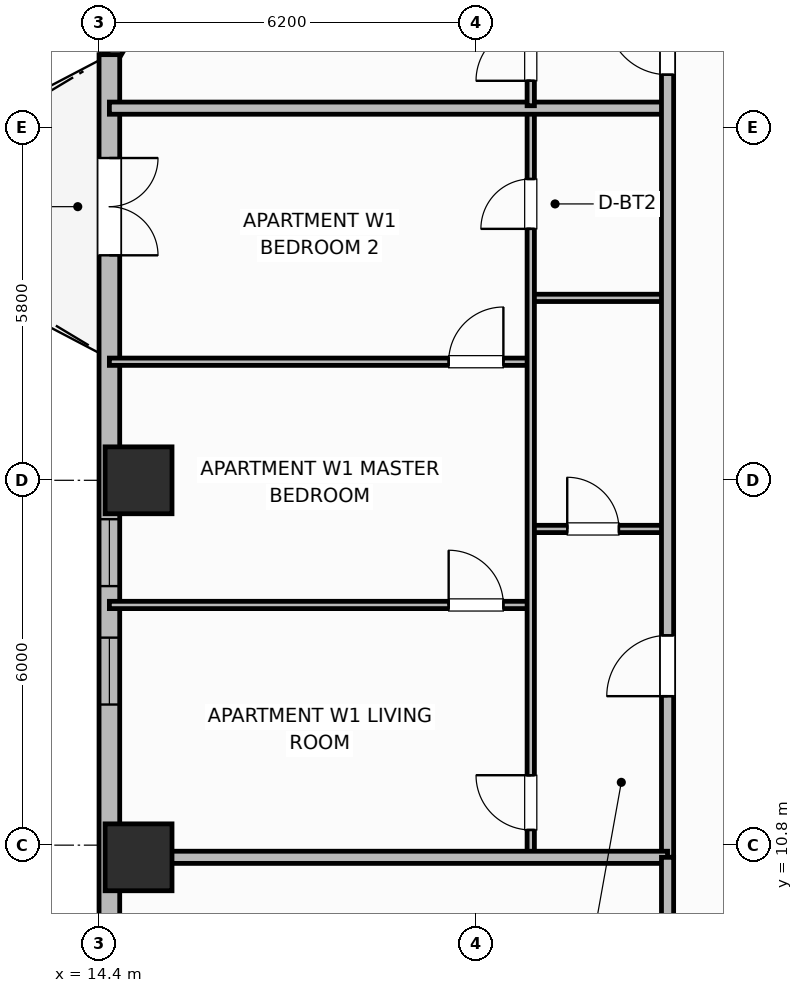
"""IFC4 building model, lengths in metres.
Left out: names, types, materials, properties, quantities, classifications, styles, units other than length and angle.
Written with IfcOpenShell. Run it as: python <this file> out.ifc"""

import sys

from ifc_helpers import new_model, si_unit, direction, frame, frame_2d, origin, origin_2d, place, context, subcontext, project, spatial, rectangle, extrude, element, fill, save


model = new_model("IFC4")
c1 = context("Model", 3, precision=1e-05, world=origin(), true_north=direction((0.0, 1.0)))
c2 = subcontext(c1, "Body", "Model", "MODEL_VIEW")
j1 = project(units=[si_unit("LENGTHUNIT", "METRE"), si_unit("PLANEANGLEUNIT", "RADIAN")], contexts=[c1])
p1 = place(None, origin())
s1 = spatial("IfcSite", under=j1, at=p1, CompositionType="ELEMENT")
p2 = place(p1, origin())
s2 = spatial("IfcBuilding", under=s1, at=p2, CompositionType="ELEMENT")
p3 = place(p2, frame((0.0, 0.0, 114.2)))
s3 = spatial("IfcBuildingStorey", under=s2, at=p3, CompositionType="ELEMENT", Elevation=114.2)
for number, where, z_axis, x_axis in (
    (1, (15.05, 10.6, 0.0), (0.0, 0.0, 1.0), (1.0, 0.0, 0.0)),
    (2, (15.05, 16.8, 0.0), (0.0, 0.0, 1.0), (1.0, 0.0, 0.0)),
):
    element("IfcColumn", number, at=place(p3, frame(where, z_axis=z_axis, x_axis=x_axis)), inside=s3, PredefinedType="COLUMN", context=c2, shape_type="SweptSolid", body=[
        extrude(rectangle(XDim=1.1, YDim=1.1, at=origin_2d()), origin(), (0.0, 0.0, 1.0), 3.7),
    ])
p4 = place(p3, frame((15.87, 26.0, 0.0), z_axis=(0.0, 0.0, 1.0), x_axis=(-0.508751843651, -0.860913213734, 0.0)))
e3 = element("IfcWall", 3, at=p4, inside=s3, PredefinedType="SOLIDWALL", context=c2, shape_type="SweptSolid", body=[
    extrude(rectangle(XDim=2.555, YDim=0.34, at=frame_2d((1.278, 0.0))), origin(), (0.0, 0.0, 1.0), 2.7),
])
p5 = place(p4, frame((0.728, 0.0, 0.89)))
e4 = element("IfcOpeningElement", 4, at=p5, cuts=e3, PredefinedType="OPENING", context=c2, shape_type="SweptSolid", body=[
    extrude(rectangle(XDim=1.1, YDim=1.65, at=frame_2d((0.55, 0.825))), frame((0.0, 0.18, 0.0), z_axis=(0.0, -1.0, 0.0), x_axis=(1.0, 0.0, 0.0)), (0.0, 0.0, 1.0), 0.36),
])
p6 = place(p3, frame((14.57, 23.8, 0.0), z_axis=(0.0, 0.0, 1.0), x_axis=(0.0, -1.0, 0.0)))
e5 = element("IfcWall", 5, at=p6, inside=s3, PredefinedType="SOLIDWALL", context=c2, shape_type="SweptSolid", body=[
    extrude(rectangle(XDim=14.8, YDim=0.34, at=frame_2d((7.4, 0.0))), origin(), (0.0, 0.0, 1.0), 2.7),
])
p7 = place(p6, frame((1.7, 0.0, 0.0)))
e6 = element("IfcOpeningElement", 6, at=p7, cuts=e5, PredefinedType="OPENING", context=c2, shape_type="SweptSolid", body=[
    extrude(rectangle(XDim=1.6, YDim=2.1, at=frame_2d((0.8, 1.05))), frame((0.0, 0.18, 0.0), z_axis=(0.0, -1.0, 0.0), x_axis=(1.0, 0.0, 0.0)), (0.0, 0.0, 1.0), 0.36),
])
p8 = place(p6, frame((7.64, 0.0, 0.89)))
e7 = element("IfcOpeningElement", 7, at=p8, cuts=e5, PredefinedType="OPENING", context=c2, shape_type="SweptSolid", body=[
    extrude(rectangle(XDim=1.1, YDim=1.65, at=frame_2d((0.55, 0.825))), frame((0.0, 0.18, 0.0), z_axis=(0.0, -1.0, 0.0), x_axis=(1.0, 0.0, 0.0)), (0.0, 0.0, 1.0), 0.36),
])
p9 = place(p6, frame((9.587, 0.0, 0.93)))
e8 = element("IfcOpeningElement", 8, at=p9, cuts=e5, PredefinedType="OPENING", context=c2, shape_type="SweptSolid", body=[
    extrude(rectangle(XDim=1.1, YDim=1.65, at=frame_2d((0.55, 0.825))), frame((0.0, 0.18, 0.0), z_axis=(0.0, -1.0, 0.0), x_axis=(1.0, 0.0, 0.0)), (0.0, 0.0, 1.0), 0.36),
])
p10 = place(p3, frame((21.5, 16.0, 0.0), z_axis=(0.0, 0.0, 1.0), x_axis=(1.0, 0.0, 0.0)))
e9 = element("IfcWall", 9, at=p10, inside=s3, PredefinedType="PARTITIONING", context=c2, shape_type="SweptSolid", body=[
    extrude(rectangle(XDim=2.25, YDim=0.12, at=frame_2d((1.125, 0.0))), origin(), (0.0, 0.0, 1.0), 2.53),
])
p11 = place(p10, frame((0.6, 0.0, 0.0)))
e10 = element("IfcOpeningElement", 10, at=p11, cuts=e9, PredefinedType="OPENING", context=c2, shape_type="SweptSolid", body=[
    extrude(rectangle(XDim=0.85, YDim=2.1, at=frame_2d((0.425, 1.05))), frame((0.0, 0.07, 0.0), z_axis=(0.0, -1.0, 0.0), x_axis=(1.0, 0.0, 0.0)), (0.0, 0.0, 1.0), 0.14),
])
p12 = place(p3, frame((21.5, 19.8, 0.0), z_axis=(0.0, 0.0, 1.0), x_axis=(1.0, 0.0, 0.0)))
e11 = element("IfcWall", 11, at=p12, inside=s3, PredefinedType="PARTITIONING", context=c2, shape_type="SweptSolid", body=[
    extrude(rectangle(XDim=2.25, YDim=0.12, at=frame_2d((1.125, 0.0))), origin(), (0.0, 0.0, 1.0), 2.53),
])
p13 = place(p3, frame((14.57, 14.75, 0.0), z_axis=(0.0, 0.0, 1.0), x_axis=(1.0, 0.0, 0.0)))
e12 = element("IfcWall", 12, at=p13, inside=s3, PredefinedType="PARTITIONING", context=c2, shape_type="SweptSolid", body=[
    extrude(rectangle(XDim=6.93, YDim=0.12, at=frame_2d((3.465, 0.0))), origin(), (0.0, 0.0, 1.0), 2.53),
])
p14 = place(p13, frame((5.58, 0.0, 0.0)))
e13 = element("IfcOpeningElement", 13, at=p14, cuts=e12, PredefinedType="OPENING", context=c2, shape_type="SweptSolid", body=[
    extrude(rectangle(XDim=0.9, YDim=2.1, at=frame_2d((0.45, 1.05))), frame((0.0, 0.07, 0.0), z_axis=(0.0, -1.0, 0.0), x_axis=(1.0, 0.0, 0.0)), (0.0, 0.0, 1.0), 0.14),
])
p15 = place(p3, frame((14.57, 18.75, 0.0), z_axis=(0.0, 0.0, 1.0), x_axis=(1.0, 0.0, 0.0)))
e14 = element("IfcWall", 14, at=p15, inside=s3, PredefinedType="PARTITIONING", context=c2, shape_type="SweptSolid", body=[
    extrude(rectangle(XDim=6.93, YDim=0.12, at=frame_2d((3.465, 0.0))), origin(), (0.0, 0.0, 1.0), 2.53),
])
p16 = place(p15, frame((5.58, 0.0, 0.0)))
e15 = element("IfcOpeningElement", 15, at=p16, cuts=e14, PredefinedType="OPENING", context=c2, shape_type="SweptSolid", body=[
    extrude(rectangle(XDim=0.9, YDim=2.1, at=frame_2d((0.45, 1.05))), frame((0.0, 0.07, 0.0), z_axis=(0.0, -1.0, 0.0), x_axis=(1.0, 0.0, 0.0)), (0.0, 0.0, 1.0), 0.14),
])
p17 = place(p3, frame((21.5, 10.64, 0.0), z_axis=(0.0, 0.0, 1.0), x_axis=(0.0, 1.0, 0.0)))
e16 = element("IfcWall", 16, at=p17, inside=s3, PredefinedType="PARTITIONING", context=c2, shape_type="SweptSolid", body=[
    extrude(rectangle(XDim=12.24, YDim=0.12, at=frame_2d((6.12, 0.0))), origin(), (0.0, 0.0, 1.0), 2.53),
])
p18 = place(p17, frame((0.41, 0.0, 0.0)))
e17 = element("IfcOpeningElement", 17, at=p18, cuts=e16, PredefinedType="OPENING", context=c2, shape_type="SweptSolid", body=[
    extrude(rectangle(XDim=0.9, YDim=2.1, at=frame_2d((0.45, 1.05))), frame((0.0, 0.07, 0.0), z_axis=(0.0, -1.0, 0.0), x_axis=(1.0, 0.0, 0.0)), (0.0, 0.0, 1.0), 0.14),
])
p19 = place(p17, frame((10.295, 0.0, 0.0)))
e18 = element("IfcOpeningElement", 18, at=p19, cuts=e16, PredefinedType="OPENING", context=c2, shape_type="SweptSolid", body=[
    extrude(rectangle(XDim=0.82, YDim=2.08, at=frame_2d((0.41, 1.04))), frame((0.0, 0.07, 0.0), z_axis=(0.0, -1.0, 0.0), x_axis=(1.0, 0.0, 0.0)), (0.0, 0.0, 1.0), 0.14),
])
p20 = place(p3, frame((14.57, 22.92, 0.0), z_axis=(0.0, 0.0, 1.0), x_axis=(1.0, 0.0, 0.0)))
e19 = element("IfcWall", 19, at=p20, inside=s3, PredefinedType="PARTITIONING", context=c2, shape_type="SweptSolid", body=[
    extrude(rectangle(XDim=9.18, YDim=0.2, at=frame_2d((4.59, 0.0))), origin(), (0.0, 0.0, 1.0), 2.53),
])
p21 = place(p3, frame((21.5, 22.96, 0.0), z_axis=(0.0, 0.0, 1.0), x_axis=(0.0, 1.0, 0.0)))
e20 = element("IfcWall", 20, at=p21, inside=s3, PredefinedType="PARTITIONING", context=c2, shape_type="SweptSolid", body=[
    extrude(rectangle(XDim=11.536, YDim=0.12, at=frame_2d((5.768, 0.0))), origin(), (0.0, 0.0, 1.0), 2.53),
])
p22 = place(p21, frame((0.41, 0.0, 0.0)))
e21 = element("IfcOpeningElement", 21, at=p22, cuts=e20, PredefinedType="OPENING", context=c2, shape_type="SweptSolid", body=[
    extrude(rectangle(XDim=0.9, YDim=2.1, at=frame_2d((0.45, 1.05))), frame((0.0, 0.07, 0.0), z_axis=(0.0, -1.0, 0.0), x_axis=(1.0, 0.0, 0.0)), (0.0, 0.0, 1.0), 0.14),
])
p23 = place(p3, frame((23.75, 10.6, 0.0), z_axis=(0.0, 0.0, 1.0), x_axis=(0.0, 1.0, 0.0)))
e22 = element("IfcWall", 22, at=p23, inside=s3, PredefinedType="PARTITIONING", context=c2, shape_type="SweptSolid", body=[
    extrude(rectangle(XDim=35.2, YDim=0.2, at=frame_2d((17.6, 0.0))), origin(), (0.0, 0.0, 1.0), 2.53),
])
p24 = place(p23, frame((2.65, 0.0, 0.0)))
e23 = element("IfcOpeningElement", 23, at=p24, cuts=e22, PredefinedType="OPENING", context=c2, shape_type="SweptSolid", body=[
    extrude(rectangle(XDim=1.0, YDim=2.15, at=frame_2d((0.5, 1.075))), frame((0.0, 0.11, 0.0), z_axis=(0.0, -1.0, 0.0), x_axis=(1.0, 0.0, 0.0)), (0.0, 0.0, 1.0), 0.22),
])
p25 = place(p23, frame((12.87, 0.0, 0.0)))
e24 = element("IfcOpeningElement", 24, at=p25, cuts=e22, PredefinedType="OPENING", context=c2, shape_type="SweptSolid", body=[
    extrude(rectangle(XDim=1.0, YDim=2.15, at=frame_2d((0.5, 1.075))), frame((0.0, 0.11, 0.0), z_axis=(0.0, -1.0, 0.0), x_axis=(1.0, 0.0, 0.0)), (0.0, 0.0, 1.0), 0.22),
])
p26 = place(p23, frame((24.486, 0.0, 0.0)))
e25 = element("IfcOpeningElement", 25, at=p26, cuts=e22, PredefinedType="OPENING", context=c2, shape_type="SweptSolid", body=[
    extrude(rectangle(XDim=1.0, YDim=2.15, at=frame_2d((0.5, 1.075))), frame((0.0, 0.11, 0.0), z_axis=(0.0, -1.0, 0.0), x_axis=(1.0, 0.0, 0.0)), (0.0, 0.0, 1.0), 0.22),
])
p27 = place(p3, frame((14.99, 10.6, 0.0), z_axis=(0.0, 0.0, 1.0), x_axis=(1.0, 0.0, 0.0)))
e26 = element("IfcWall", 26, at=p27, inside=s3, PredefinedType="PARTITIONING", context=c2, shape_type="SweptSolid", body=[
    extrude(rectangle(XDim=8.76, YDim=0.2, at=frame_2d((4.38, 0.0))), origin(), (0.0, 0.0, 1.0), 2.53),
])
p28 = place(p3, frame((23.75, 4.97, 0.0), z_axis=(0.0, 0.0, 1.0), x_axis=(0.0, 1.0, 0.0)))
e27 = element("IfcWall", 27, at=p28, inside=s3, PredefinedType="PARTITIONING", context=c2, shape_type="SweptSolid", body=[
    extrude(rectangle(XDim=5.63, YDim=0.2, at=frame_2d((2.815, 0.0))), origin(), (0.0, 0.0, 1.0), 2.53),
])
p29 = place(p7, origin())
e28 = element("IfcDoor", 28, at=p29, inside=s3, OperationType="DOUBLE_DOOR_SINGLE_SWING", PredefinedType="DOOR", context=c2, shape_type="SweptSolid", body=[
    extrude(rectangle(XDim=1.6, YDim=2.1, at=frame_2d((0.8, 1.05))), frame((0.0, 0.025, 0.0), z_axis=(0.0, -1.0, 0.0), x_axis=(1.0, 0.0, 0.0)), (0.0, 0.0, 1.0), 0.05),
])
fill(e6, e28)
p30 = place(p8, origin())
e29 = element("IfcWindow", 29, at=p30, inside=s3, PartitioningType="SINGLE_PANEL", PredefinedType="WINDOW", context=c2, shape_type="SweptSolid", body=[
    extrude(rectangle(XDim=1.1, YDim=1.65, at=frame_2d((0.55, 0.825))), frame((0.0, 0.03, 0.0), z_axis=(0.0, -1.0, 0.0), x_axis=(1.0, 0.0, 0.0)), (0.0, 0.0, 1.0), 0.06),
])
fill(e7, e29)
p31 = place(p9, origin())
e30 = element("IfcWindow", 30, at=p31, inside=s3, PartitioningType="SINGLE_PANEL", PredefinedType="WINDOW", context=c2, shape_type="SweptSolid", body=[
    extrude(rectangle(XDim=1.1, YDim=1.65, at=frame_2d((0.55, 0.825))), frame((0.0, 0.03, 0.0), z_axis=(0.0, -1.0, 0.0), x_axis=(1.0, 0.0, 0.0)), (0.0, 0.0, 1.0), 0.06),
])
fill(e8, e30)
p32 = place(p11, origin())
e31 = element("IfcDoor", 31, at=p32, inside=s3, OperationType="SINGLE_SWING_LEFT", PredefinedType="DOOR", context=c2, shape_type="SweptSolid", body=[
    extrude(rectangle(XDim=0.85, YDim=2.1, at=frame_2d((0.425, 1.05))), frame((0.0, 0.025, 0.0), z_axis=(0.0, -1.0, 0.0), x_axis=(1.0, 0.0, 0.0)), (0.0, 0.0, 1.0), 0.05),
])
fill(e10, e31)
p33 = place(p14, origin())
e32 = element("IfcDoor", 32, at=p33, inside=s3, OperationType="SINGLE_SWING_LEFT", PredefinedType="DOOR", context=c2, shape_type="SweptSolid", body=[
    extrude(rectangle(XDim=0.9, YDim=2.1, at=frame_2d((0.45, 1.05))), frame((0.0, 0.025, 0.0), z_axis=(0.0, -1.0, 0.0), x_axis=(1.0, 0.0, 0.0)), (0.0, 0.0, 1.0), 0.05),
])
fill(e13, e32)
p34 = place(p16, origin())
e33 = element("IfcDoor", 33, at=p34, inside=s3, OperationType="SINGLE_SWING_RIGHT", PredefinedType="DOOR", context=c2, shape_type="SweptSolid", body=[
    extrude(rectangle(XDim=0.9, YDim=2.1, at=frame_2d((0.45, 1.05))), frame((0.0, 0.025, 0.0), z_axis=(0.0, -1.0, 0.0), x_axis=(1.0, 0.0, 0.0)), (0.0, 0.0, 1.0), 0.05),
])
fill(e15, e33)
p35 = place(p18, origin())
e34 = element("IfcDoor", 34, at=p35, inside=s3, OperationType="SINGLE_SWING_RIGHT", PredefinedType="DOOR", context=c2, shape_type="SweptSolid", body=[
    extrude(rectangle(XDim=0.9, YDim=2.1, at=frame_2d((0.45, 1.05))), frame((0.0, 0.025, 0.0), z_axis=(0.0, -1.0, 0.0), x_axis=(1.0, 0.0, 0.0)), (0.0, 0.0, 1.0), 0.05),
])
fill(e17, e34)
p36 = place(p19, origin())
e35 = element("IfcDoor", 35, at=p36, inside=s3, OperationType="SINGLE_SWING_LEFT", PredefinedType="DOOR", context=c2, shape_type="SweptSolid", body=[
    extrude(rectangle(XDim=0.82, YDim=2.08, at=frame_2d((0.41, 1.04))), frame((0.0, 0.025, 0.0), z_axis=(0.0, -1.0, 0.0), x_axis=(1.0, 0.0, 0.0)), (0.0, 0.0, 1.0), 0.05),
])
fill(e18, e35)
p37 = place(p22, origin())
e36 = element("IfcDoor", 36, at=p37, inside=s3, OperationType="SINGLE_SWING_LEFT", PredefinedType="DOOR", context=c2, shape_type="SweptSolid", body=[
    extrude(rectangle(XDim=0.9, YDim=2.1, at=frame_2d((0.45, 1.05))), frame((0.0, 0.025, 0.0), z_axis=(0.0, -1.0, 0.0), x_axis=(1.0, 0.0, 0.0)), (0.0, 0.0, 1.0), 0.05),
])
fill(e21, e36)
p38 = place(p24, origin())
e37 = element("IfcDoor", 37, at=p38, inside=s3, OperationType="SINGLE_SWING_LEFT", PredefinedType="DOOR", context=c2, shape_type="SweptSolid", body=[
    extrude(rectangle(XDim=1.0, YDim=2.15, at=frame_2d((0.5, 1.075))), frame((0.0, 0.025, 0.0), z_axis=(0.0, -1.0, 0.0), x_axis=(1.0, 0.0, 0.0)), (0.0, 0.0, 1.0), 0.05),
])
fill(e23, e37)
p39 = place(p25, origin())
e38 = element("IfcDoor", 38, at=p39, inside=s3, OperationType="SINGLE_SWING_RIGHT", PredefinedType="DOOR", context=c2, shape_type="SweptSolid", body=[
    extrude(rectangle(XDim=1.0, YDim=2.15, at=frame_2d((0.5, 1.075))), frame((0.0, 0.025, 0.0), z_axis=(0.0, -1.0, 0.0), x_axis=(1.0, 0.0, 0.0)), (0.0, 0.0, 1.0), 0.05),
])
fill(e24, e38)
save(model, sys.argv[1])
